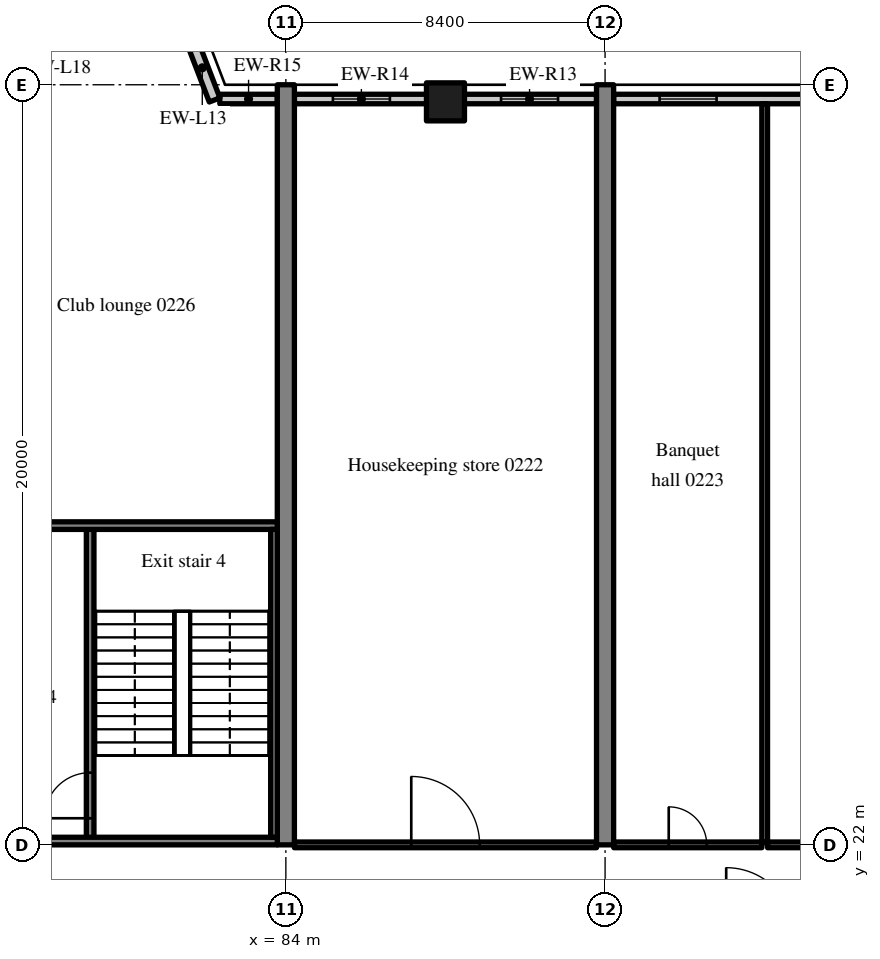
"""IFC4 building model, lengths in metres.
Left out: names, types, materials, properties, quantities, classifications, styles, units other than length and angle.
Written with IfcOpenShell. Run it as: python <this file> out.ifc"""

import sys

from ifc_helpers import new_model, si_unit, direction, frame, frame_2d, origin, origin_2d, place, context, subcontext, project, spatial, rectangle, extrude, source, transform, mapped, element, fill, save


model = new_model("IFC4")
c1 = context("Model", 3, precision=1e-05, world=origin(), true_north=direction((0.0, 1.0)))
c2 = subcontext(c1, "Body", "Model", "MODEL_VIEW")
j1 = project(units=[si_unit("LENGTHUNIT", "METRE"), si_unit("PLANEANGLEUNIT", "RADIAN")], contexts=[c1])
p1 = place(None, origin())
s1 = spatial("IfcSite", under=j1, at=p1, CompositionType="ELEMENT")
p2 = place(p1, origin())
s2 = spatial("IfcBuilding", under=s1, at=p2, CompositionType="ELEMENT")
p3 = place(p2, frame((0.0, 0.0, 11.4)))
s3 = spatial("IfcBuildingStorey", under=s2, at=p3, CompositionType="ELEMENT", Elevation=11.4)
m1 = source(origin(), c2, "Body", "SweptSolid", [
    extrude(rectangle(XDim=20.0, YDim=0.45, at=frame_2d((10.0, 0.0))), origin(), (0.0, 0.0, 1.0), 6.32),
])
for number, where, z_axis, x_axis in (
    (1, (84.0, 22.0, 0.0), (0.0, 0.0, 1.0), (0.0, 1.0, 0.0)),
    (2, (92.4, 22.0, 0.0), (0.0, 0.0, 1.0), (0.0, 1.0, 0.0)),
):
    element("IfcWall", number, at=place(p3, frame(where, z_axis=z_axis, x_axis=x_axis)), inside=s3, PredefinedType="SHEAR", context=c2, shape_type="MappedRepresentation", body=[
        mapped(m1, transform((0.0, 0.0, 0.0), scale=1.0)),
    ])
m2 = source(origin(), c2, "Body", "SweptSolid", [
    extrude(rectangle(XDim=1.0, YDim=1.0, at=origin_2d()), origin(), (0.0, 0.0, 1.0), 6.32),
])
p4 = place(p3, frame((88.2, 41.55, 0.0), z_axis=(0.0, 0.0, 1.0), x_axis=(1.0, 0.0, 0.0)))
e3 = element("IfcColumn", 3, at=p4, inside=s3, PredefinedType="COLUMN", context=c2, shape_type="MappedRepresentation", body=[
    mapped(m2, transform((0.0, 0.0, 0.0), scale=1.0)),
])
m3 = source(origin(), c2, "Body", "SweptSolid", [
    extrude(rectangle(XDim=15.675, YDim=0.25, at=frame_2d((7.837, 0.0))), origin(), (0.0, 0.0, 1.0), 5.57),
])
p5 = place(p3, frame((108.3, 41.625, 0.0), z_axis=(0.0, 0.0, 1.0), x_axis=(-1.0, 0.0, 0.0)))
e4 = element("IfcWall", 4, at=p5, inside=s3, PredefinedType="SOLIDWALL", context=c2, shape_type="MappedRepresentation", body=[
    mapped(m3, transform((0.0, 0.0, 0.0), scale=1.0)),
])
m4 = source(origin(), c2, "Body", "SweptSolid", [
    extrude(rectangle(XDim=1.5, YDim=1.5, at=frame_2d((0.75, 0.75))), frame((0.0, 0.135, 0.0), z_axis=(0.0, -1.0, 0.0), x_axis=(1.0, 0.0, 0.0)), (0.0, 0.0, 1.0), 0.27),
])
p6 = place(p5, frame((1.209, 0.0, 0.9)))
e5 = element("IfcOpeningElement", 5, at=p6, cuts=e4, PredefinedType="OPENING", context=c2, shape_type="MappedRepresentation", body=[
    mapped(m4, transform((0.0, 0.0, 0.0), scale=1.0)),
])
p7 = place(p5, frame((5.128, 0.0, 0.9)))
e6 = element("IfcOpeningElement", 6, at=p7, cuts=e4, PredefinedType="OPENING", context=c2, shape_type="MappedRepresentation", body=[
    mapped(m4, transform((0.0, 0.0, 0.0), scale=1.0)),
])
p8 = place(p5, frame((9.047, 0.0, 0.9)))
e7 = element("IfcOpeningElement", 7, at=p8, cuts=e4, PredefinedType="OPENING", context=c2, shape_type="MappedRepresentation", body=[
    mapped(m4, transform((0.0, 0.0, 0.0), scale=1.0)),
])
p9 = place(p5, frame((12.966, 0.0, 0.9)))
e8 = element("IfcOpeningElement", 8, at=p9, cuts=e4, PredefinedType="OPENING", context=c2, shape_type="MappedRepresentation", body=[
    mapped(m4, transform((0.0, 0.0, 0.0), scale=1.0)),
])
m5 = source(origin(), c2, "Body", "SweptSolid", [
    extrude(rectangle(XDim=3.525, YDim=0.25, at=frame_2d((1.763, 0.0))), origin(), (0.0, 0.0, 1.0), 5.57),
])
p10 = place(p3, frame((92.175, 41.625, 0.0), z_axis=(0.0, 0.0, 1.0), x_axis=(-1.0, 0.0, 0.0)))
e9 = element("IfcWall", 9, at=p10, inside=s3, PredefinedType="SOLIDWALL", context=c2, shape_type="MappedRepresentation", body=[
    mapped(m5, transform((0.0, 0.0, 0.0), scale=1.0)),
])
p11 = place(p10, frame((1.012, 0.0, 0.9)))
e10 = element("IfcOpeningElement", 10, at=p11, cuts=e9, PredefinedType="OPENING", context=c2, shape_type="MappedRepresentation", body=[
    mapped(m4, transform((0.0, 0.0, 0.0), scale=1.0)),
])
m6 = source(origin(), c2, "Body", "SweptSolid", [
    extrude(rectangle(XDim=3.525, YDim=0.25, at=frame_2d((1.762, 0.0))), origin(), (0.0, 0.0, 1.0), 5.57),
])
p12 = place(p3, frame((87.75, 41.625, 0.0), z_axis=(0.0, 0.0, 1.0), x_axis=(-1.0, 0.0, 0.0)))
e11 = element("IfcWall", 11, at=p12, inside=s3, PredefinedType="SOLIDWALL", context=c2, shape_type="MappedRepresentation", body=[
    mapped(m6, transform((0.0, 0.0, 0.0), scale=1.0)),
])
p13 = place(p12, frame((1.012, 0.0, 0.9)))
e12 = element("IfcOpeningElement", 12, at=p13, cuts=e11, PredefinedType="OPENING", context=c2, shape_type="MappedRepresentation", body=[
    mapped(m4, transform((0.0, 0.0, 0.0), scale=1.0)),
])
m7 = source(origin(), c2, "Body", "SweptSolid", [
    extrude(rectangle(XDim=1.513, YDim=0.25, at=frame_2d((0.756, 0.0))), origin(), (0.0, 0.0, 1.0), 5.57),
])
p14 = place(p3, frame((83.775, 41.625, 0.0), z_axis=(0.0, 0.0, 1.0), x_axis=(-1.0, 0.0, 0.0)))
e13 = element("IfcWall", 13, at=p14, inside=s3, PredefinedType="SOLIDWALL", context=c2, shape_type="MappedRepresentation", body=[
    mapped(m7, transform((0.0, 0.0, 0.0), scale=1.0)),
])
m8 = source(origin(), c2, "Body", "SweptSolid", [
    extrude(rectangle(XDim=1.812, YDim=0.3, at=frame_2d((0.906, 0.0))), origin(), (0.0, 0.0, 1.0), 6.32),
])
p15 = place(p3, frame((82.125, 41.6, 0.0), z_axis=(0.0, 0.0, 1.0), x_axis=(-0.357877270961, 0.93376863244, 0.0)))
e14 = element("IfcWall", 14, at=p15, inside=s3, PredefinedType="SOLIDWALL", context=c2, shape_type="MappedRepresentation", body=[
    mapped(m8, transform((0.0, 0.0, 0.0), scale=1.0)),
])
m9 = source(origin(), c2, "Body", "SweptSolid", [
    extrude(rectangle(XDim=8.3, YDim=0.2, at=frame_2d((4.15, 0.0))), origin(), (0.0, 0.0, 1.0), 6.32),
])
p16 = place(p3, frame((78.85, 22.1, 0.0), z_axis=(0.0, 0.0, 1.0), x_axis=(0.0, 1.0, 0.0)))
e15 = element("IfcWall", 15, at=p16, inside=s3, PredefinedType="SOLIDWALL", context=c2, shape_type="MappedRepresentation", body=[
    mapped(m9, transform((0.0, 0.0, 0.0), scale=1.0)),
])
m10 = source(origin(), c2, "Body", "SweptSolid", [
    extrude(rectangle(XDim=1.2, YDim=2.1, at=frame_2d((0.6, 1.05))), frame((0.0, 0.11, 0.0), z_axis=(0.0, -1.0, 0.0), x_axis=(1.0, 0.0, 0.0)), (0.0, 0.0, 1.0), 0.22),
])
p17 = place(p16, frame((0.6, 0.0, 0.0)))
e16 = element("IfcOpeningElement", 16, at=p17, cuts=e15, PredefinedType="OPENING", context=c2, shape_type="MappedRepresentation", body=[
    mapped(m10, transform((0.0, 0.0, 0.0), scale=1.0)),
])
m11 = source(origin(), c2, "Body", "SweptSolid", [
    extrude(rectangle(XDim=8.175, YDim=0.2, at=frame_2d((4.087, 0.0))), origin(), (0.0, 0.0, 1.0), 6.32),
])
p18 = place(p3, frame((83.775, 22.1, 0.0), z_axis=(0.0, 0.0, 1.0), x_axis=(-1.0, 0.0, 0.0)))
e17 = element("IfcWall", 17, at=p18, inside=s3, PredefinedType="SOLIDWALL", context=c2, shape_type="MappedRepresentation", body=[
    mapped(m11, transform((0.0, 0.0, 0.0), scale=1.0)),
])
p19 = place(p18, frame((5.975, 0.0, 0.0)))
e18 = element("IfcOpeningElement", 18, at=p19, cuts=e17, PredefinedType="OPENING", context=c2, shape_type="MappedRepresentation", body=[
    mapped(m10, transform((0.0, 0.0, 0.0), scale=1.0)),
])
p20 = place(p3, frame((83.775, 30.4, 0.0), z_axis=(0.0, 0.0, 1.0), x_axis=(-1.0, 0.0, 0.0)))
e19 = element("IfcWall", 19, at=p20, inside=s3, PredefinedType="SOLIDWALL", context=c2, shape_type="MappedRepresentation", body=[
    mapped(m11, transform((0.0, 0.0, 0.0), scale=1.0)),
])
m12 = source(origin(), c2, "Body", "SweptSolid", [
    extrude(rectangle(XDim=1.0, YDim=2.1, at=frame_2d((0.5, 1.05))), frame((0.0, 0.11, 0.0), z_axis=(0.0, -1.0, 0.0), x_axis=(1.0, 0.0, 0.0)), (0.0, 0.0, 1.0), 0.22),
])
p21 = place(p20, frame((6.075, 0.0, 0.0)))
e20 = element("IfcOpeningElement", 20, at=p21, cuts=e19, PredefinedType="OPENING", context=c2, shape_type="MappedRepresentation", body=[
    mapped(m12, transform((0.0, 0.0, 0.0), scale=1.0)),
])
m13 = source(origin(), c2, "Body", "SweptSolid", [
    extrude(rectangle(XDim=8.1, YDim=0.175, at=frame_2d((4.05, 0.0))), origin(), (0.0, 0.0, 1.0), 6.32),
])
p22 = place(p3, frame((83.688, 22.2, 0.0), z_axis=(0.0, 0.0, 1.0), x_axis=(0.0, 1.0, 0.0)))
e21 = element("IfcWall", 21, at=p22, inside=s3, PredefinedType="SOLIDWALL", context=c2, shape_type="MappedRepresentation", body=[
    mapped(m13, transform((0.0, 0.0, 0.0), scale=1.0)),
])
m14 = source(origin(), c2, "Body", "SweptSolid", [
    extrude(rectangle(XDim=7.95, YDim=0.15, at=frame_2d((3.975, 0.0))), origin(), (0.0, 0.0, 1.0), 5.62),
])
p23 = place(p3, frame((84.225, 22.0, 0.0), z_axis=(0.0, 0.0, 1.0), x_axis=(1.0, 0.0, 0.0)))
e22 = element("IfcWall", 22, at=p23, inside=s3, PredefinedType="PARTITIONING", context=c2, shape_type="MappedRepresentation", body=[
    mapped(m14, transform((0.0, 0.0, 0.0), scale=1.0)),
])
m15 = source(origin(), c2, "Body", "SweptSolid", [
    extrude(rectangle(XDim=1.8, YDim=2.1, at=frame_2d((0.9, 1.05))), frame((0.0, 0.085, 0.0), z_axis=(0.0, -1.0, 0.0), x_axis=(1.0, 0.0, 0.0)), (0.0, 0.0, 1.0), 0.17),
])
p24 = place(p23, frame((3.075, 0.0, 0.0)))
e23 = element("IfcOpeningElement", 23, at=p24, cuts=e22, PredefinedType="OPENING", context=c2, shape_type="MappedRepresentation", body=[
    mapped(m15, transform((0.0, 0.0, 0.0), scale=1.0)),
])
m16 = source(origin(), c2, "Body", "SweptSolid", [
    extrude(rectangle(XDim=3.9, YDim=0.15, at=frame_2d((1.95, 0.0))), origin(), (0.0, 0.0, 1.0), 5.62),
])
p25 = place(p3, frame((92.625, 22.0, 0.0), z_axis=(0.0, 0.0, 1.0), x_axis=(1.0, 0.0, 0.0)))
e24 = element("IfcWall", 24, at=p25, inside=s3, PredefinedType="PARTITIONING", context=c2, shape_type="MappedRepresentation", body=[
    mapped(m16, transform((0.0, 0.0, 0.0), scale=1.0)),
])
m17 = source(origin(), c2, "Body", "SweptSolid", [
    extrude(rectangle(XDim=1.0, YDim=2.1, at=frame_2d((0.5, 1.05))), frame((0.0, 0.085, 0.0), z_axis=(0.0, -1.0, 0.0), x_axis=(1.0, 0.0, 0.0)), (0.0, 0.0, 1.0), 0.17),
])
p26 = place(p25, frame((1.45, 0.0, 0.0)))
e25 = element("IfcOpeningElement", 25, at=p26, cuts=e24, PredefinedType="OPENING", context=c2, shape_type="MappedRepresentation", body=[
    mapped(m17, transform((0.0, 0.0, 0.0), scale=1.0)),
])
m18 = source(origin(), c2, "Body", "SweptSolid", [
    extrude(rectangle(XDim=3.675, YDim=0.15, at=frame_2d((1.837, 0.0))), origin(), (0.0, 0.0, 1.0), 5.62),
])
p27 = place(p3, frame((96.675, 22.0, 0.0), z_axis=(0.0, 0.0, 1.0), x_axis=(1.0, 0.0, 0.0)))
e26 = element("IfcWall", 26, at=p27, inside=s3, PredefinedType="PARTITIONING", context=c2, shape_type="MappedRepresentation", body=[
    mapped(m18, transform((0.0, 0.0, 0.0), scale=1.0)),
])
p28 = place(p27, frame((1.337, 0.0, 0.0)))
e27 = element("IfcOpeningElement", 27, at=p28, cuts=e26, PredefinedType="OPENING", context=c2, shape_type="MappedRepresentation", body=[
    mapped(m17, transform((0.0, 0.0, 0.0), scale=1.0)),
])
m19 = source(origin(), c2, "Body", "SweptSolid", [
    extrude(rectangle(XDim=19.425, YDim=0.15, at=frame_2d((9.712, 0.0))), origin(), (0.0, 0.0, 1.0), 6.32),
])
p29 = place(p3, frame((96.6, 22.075, 0.0), z_axis=(0.0, 0.0, 1.0), x_axis=(0.0, 1.0, 0.0)))
e28 = element("IfcWall", 28, at=p29, inside=s3, PredefinedType="PARTITIONING", context=c2, shape_type="MappedRepresentation", body=[
    mapped(m19, transform((0.0, 0.0, 0.0), scale=1.0)),
])
m20 = source(origin(), c2, "Body", "SweptSolid", [
    extrude(rectangle(XDim=1.5, YDim=1.5, at=frame_2d((0.75, 0.75))), frame((0.0, 0.03, 0.0), z_axis=(0.0, -1.0, 0.0), x_axis=(1.0, 0.0, 0.0)), (0.0, 0.0, 1.0), 0.06),
])
p30 = place(p9, origin())
e29 = element("IfcWindow", 29, at=p30, inside=s3, PartitioningType="SINGLE_PANEL", PredefinedType="WINDOW", context=c2, shape_type="MappedRepresentation", body=[
    mapped(m20, transform((0.0, 0.0, 0.0), scale=1.0)),
])
fill(e8, e29)
p31 = place(p11, origin())
e30 = element("IfcWindow", 30, at=p31, inside=s3, PartitioningType="SINGLE_PANEL", PredefinedType="WINDOW", context=c2, shape_type="MappedRepresentation", body=[
    mapped(m20, transform((0.0, 0.0, 0.0), scale=1.0)),
])
fill(e10, e30)
p32 = place(p13, origin())
e31 = element("IfcWindow", 31, at=p32, inside=s3, PartitioningType="SINGLE_PANEL", PredefinedType="WINDOW", context=c2, shape_type="MappedRepresentation", body=[
    mapped(m20, transform((0.0, 0.0, 0.0), scale=1.0)),
])
fill(e12, e31)
m21 = source(origin(), c2, "Body", "SweptSolid", [
    extrude(rectangle(XDim=1.2, YDim=2.1, at=frame_2d((0.6, 1.05))), frame((0.0, 0.025, 0.0), z_axis=(0.0, -1.0, 0.0), x_axis=(1.0, 0.0, 0.0)), (0.0, 0.0, 1.0), 0.05),
])
p33 = place(p17, origin())
e32 = element("IfcDoor", 32, at=p33, inside=s3, OperationType="SINGLE_SWING_LEFT", PredefinedType="DOOR", context=c2, shape_type="MappedRepresentation", body=[
    mapped(m21, transform((0.0, 0.0, 0.0), scale=1.0)),
])
fill(e16, e32)
m22 = source(origin(), c2, "Body", "SweptSolid", [
    extrude(rectangle(XDim=1.8, YDim=2.1, at=frame_2d((0.9, 1.05))), frame((0.0, 0.025, 0.0), z_axis=(0.0, -1.0, 0.0), x_axis=(1.0, 0.0, 0.0)), (0.0, 0.0, 1.0), 0.05),
])
p34 = place(p24, origin())
e33 = element("IfcDoor", 33, at=p34, inside=s3, OperationType="DOUBLE_DOOR_SINGLE_SWING", PredefinedType="DOOR", context=c2, shape_type="MappedRepresentation", body=[
    mapped(m22, transform((0.0, 0.0, 0.0), scale=1.0)),
])
fill(e23, e33)
m23 = source(origin(), c2, "Body", "SweptSolid", [
    extrude(rectangle(XDim=1.0, YDim=2.1, at=frame_2d((0.5, 1.05))), frame((0.0, 0.025, 0.0), z_axis=(0.0, -1.0, 0.0), x_axis=(1.0, 0.0, 0.0)), (0.0, 0.0, 1.0), 0.05),
])
p35 = place(p26, origin())
e34 = element("IfcDoor", 34, at=p35, inside=s3, OperationType="SINGLE_SWING_LEFT", PredefinedType="DOOR", context=c2, shape_type="MappedRepresentation", body=[
    mapped(m23, transform((0.0, 0.0, 0.0), scale=1.0)),
])
fill(e25, e34)
save(model, sys.argv[1])
